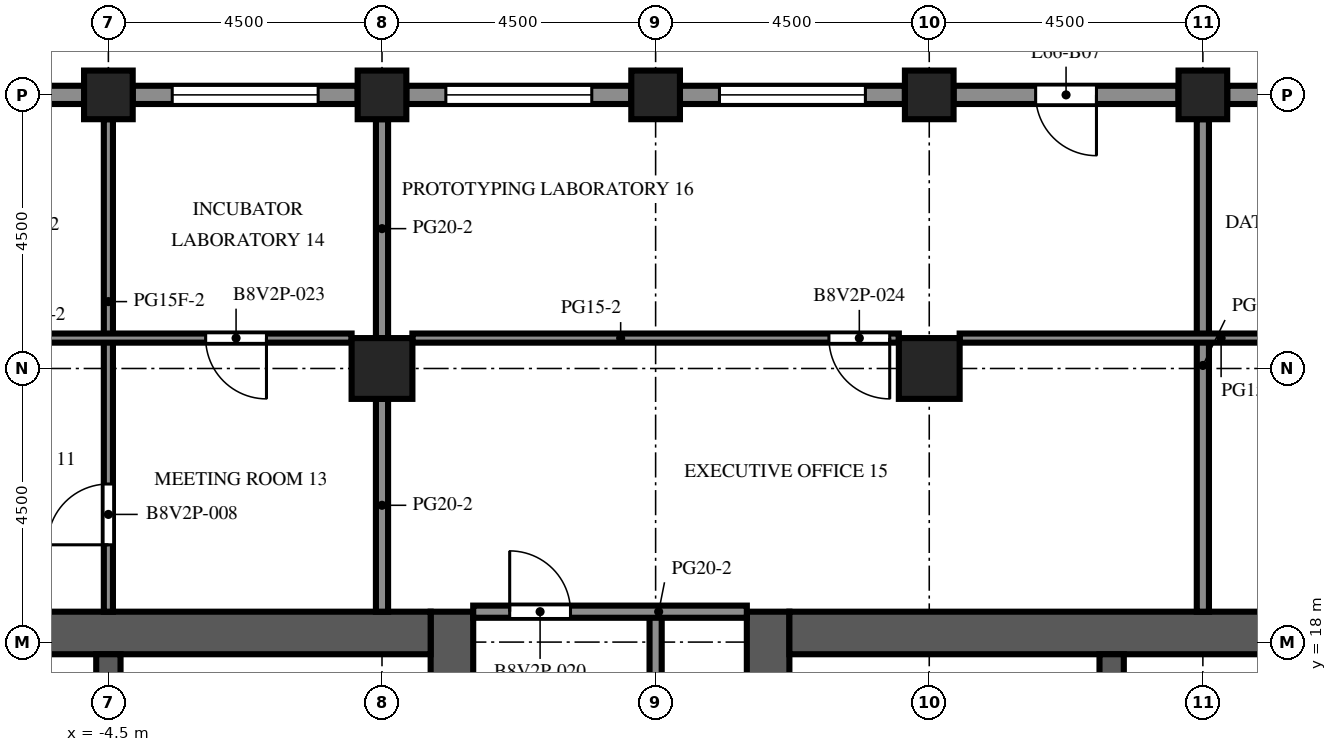
"""IFC4 building model, lengths in metres.
Left out: names, types, materials, properties, quantities, classifications, styles, units other than length and angle.
Written with IfcOpenShell. Run it as: python <this file> out.ifc"""

import sys

from ifc_helpers import new_model, si_unit, direction, frame, frame_2d, origin, origin_2d, place, context, subcontext, project, spatial, rectangle, extrude, element, fill, save


model = new_model("IFC4")
c1 = context("Model", 3, precision=1e-05, world=origin(), true_north=direction((0.0, 1.0)))
c2 = subcontext(c1, "Body", "Model", "MODEL_VIEW")
j1 = project(units=[si_unit("LENGTHUNIT", "METRE"), si_unit("PLANEANGLEUNIT", "RADIAN")], contexts=[c1])
p1 = place(None, origin())
s1 = spatial("IfcSite", under=j1, at=p1, CompositionType="ELEMENT")
p2 = place(p1, origin())
s2 = spatial("IfcBuilding", under=s1, at=p2, CompositionType="ELEMENT")
p3 = place(p2, frame((0.0, 0.0, 290.9)))
s3 = spatial("IfcBuildingStorey", under=s2, at=p3, CompositionType="ELEMENT", Elevation=290.9)
for number, where, z_axis, x_axis in (
    (1, (-4.5, 27.0, 0.0), (0.0, 0.0, 1.0), (1.0, 0.0, 0.0)),
    (2, (0.0, 27.0, 0.0), (0.0, 0.0, 1.0), (1.0, 0.0, 0.0)),
    (3, (4.5, 27.0, 0.0), (0.0, 0.0, 1.0), (1.0, 0.0, 0.0)),
    (4, (9.0, 27.0, 0.0), (0.0, 0.0, 1.0), (1.0, 0.0, 0.0)),
    (5, (13.5, 27.0, 0.0), (0.0, 0.0, 1.0), (1.0, 0.0, 0.0)),
):
    element("IfcColumn", number, at=place(p3, frame(where, z_axis=z_axis, x_axis=x_axis)), inside=s3, PredefinedType="COLUMN", context=c2, shape_type="SweptSolid", body=[
        extrude(rectangle(XDim=0.8, YDim=0.8, at=origin_2d()), origin(), (0.0, 0.0, 1.0), 4.1),
    ])
for number, where, z_axis, x_axis in (
    (6, (0.0, 22.5, 0.0), (0.0, 0.0, 1.0), (1.0, 0.0, 0.0)),
    (7, (9.0, 22.5, 0.0), (0.0, 0.0, 1.0), (1.0, 0.0, 0.0)),
):
    element("IfcColumn", number, at=place(p3, frame(where, z_axis=z_axis, x_axis=x_axis)), inside=s3, PredefinedType="COLUMN", context=c2, shape_type="SweptSolid", body=[
        extrude(rectangle(XDim=1.0, YDim=1.0, at=origin_2d()), origin(), (0.0, 0.0, 1.0), 4.1),
    ])
p4 = place(p3, frame((1.15, -9.0, 0.0), z_axis=(0.0, 0.0, 1.0), x_axis=(0.0, 1.0, 0.0)))
e8 = element("IfcWall", 8, at=p4, inside=s3, PredefinedType="SHEAR", context=c2, shape_type="SweptSolid", body=[
    extrude(rectangle(XDim=27.5, YDim=0.7, at=frame_2d((13.75, 0.0))), origin(), (0.0, 0.0, 1.0), 4.1),
])
p5 = place(p4, frame((12.55, 0.0, 0.0)))
e9 = element("IfcOpeningElement", 9, at=p5, cuts=e8, PredefinedType="OPENING", context=c2, shape_type="SweptSolid", body=[
    extrude(rectangle(XDim=2.4, YDim=2.4, at=frame_2d((1.2, 1.2))), frame((0.0, 0.36, 0.0), z_axis=(0.0, -1.0, 0.0), x_axis=(1.0, 0.0, 0.0)), (0.0, 0.0, 1.0), 0.72),
])
p6 = place(p4, frame((3.9, 0.0, 0.0)))
e10 = element("IfcOpeningElement", 10, at=p6, cuts=e8, PredefinedType="OPENING", context=c2, shape_type="SweptSolid", body=[
    extrude(rectangle(XDim=1.2, YDim=2.1, at=frame_2d((0.6, 1.05))), frame((0.0, 0.36, 0.0), z_axis=(0.0, -1.0, 0.0), x_axis=(1.0, 0.0, 0.0)), (0.0, 0.0, 1.0), 0.72),
])
p7 = place(p4, frame((22.4, 0.0, 0.0)))
e11 = element("IfcOpeningElement", 11, at=p7, cuts=e8, PredefinedType="OPENING", context=c2, shape_type="SweptSolid", body=[
    extrude(rectangle(XDim=1.2, YDim=2.1, at=frame_2d((0.6, 1.05))), frame((0.0, 0.36, 0.0), z_axis=(0.0, -1.0, 0.0), x_axis=(1.0, 0.0, 0.0)), (0.0, 0.0, 1.0), 0.72),
])
p8 = place(p3, frame((-9.8, 18.15, 0.0), z_axis=(0.0, 0.0, 1.0), x_axis=(1.0, 0.0, 0.0)))
e12 = element("IfcWall", 12, at=p8, inside=s3, PredefinedType="SHEAR", context=c2, shape_type="SweptSolid", body=[
    extrude(rectangle(XDim=10.6, YDim=0.7, at=frame_2d((5.3, 0.0))), origin(), (0.0, 0.0, 1.0), 4.1),
])
p9 = place(p3, frame((-4.5, 10.2, 0.0), z_axis=(0.0, 0.0, 1.0), x_axis=(0.0, 1.0, 0.0)))
e13 = element("IfcWall", 13, at=p9, inside=s3, PredefinedType="SHEAR", context=c2, shape_type="SweptSolid", body=[
    extrude(rectangle(XDim=7.6, YDim=0.4, at=frame_2d((3.8, 0.0))), origin(), (0.0, 0.0, 1.0), 4.1),
])
p10 = place(p3, frame((6.35, -9.0, 0.0), z_axis=(0.0, 0.0, 1.0), x_axis=(0.0, 1.0, 0.0)))
e14 = element("IfcWall", 14, at=p10, inside=s3, PredefinedType="SHEAR", context=c2, shape_type="SweptSolid", body=[
    extrude(rectangle(XDim=27.5, YDim=0.7, at=frame_2d((13.75, 0.0))), origin(), (0.0, 0.0, 1.0), 4.1),
])
p11 = place(p10, frame((12.55, 0.0, 0.0)))
e15 = element("IfcOpeningElement", 15, at=p11, cuts=e14, PredefinedType="OPENING", context=c2, shape_type="SweptSolid", body=[
    extrude(rectangle(XDim=2.4, YDim=2.4, at=frame_2d((1.2, 1.2))), frame((0.0, 0.36, 0.0), z_axis=(0.0, -1.0, 0.0), x_axis=(1.0, 0.0, 0.0)), (0.0, 0.0, 1.0), 0.72),
])
p12 = place(p10, frame((3.9, 0.0, 0.0)))
e16 = element("IfcOpeningElement", 16, at=p12, cuts=e14, PredefinedType="OPENING", context=c2, shape_type="SweptSolid", body=[
    extrude(rectangle(XDim=1.2, YDim=2.1, at=frame_2d((0.6, 1.05))), frame((0.0, 0.36, 0.0), z_axis=(0.0, -1.0, 0.0), x_axis=(1.0, 0.0, 0.0)), (0.0, 0.0, 1.0), 0.72),
])
p13 = place(p10, frame((22.4, 0.0, 0.0)))
e17 = element("IfcOpeningElement", 17, at=p13, cuts=e14, PredefinedType="OPENING", context=c2, shape_type="SweptSolid", body=[
    extrude(rectangle(XDim=1.2, YDim=2.1, at=frame_2d((0.6, 1.05))), frame((0.0, 0.36, 0.0), z_axis=(0.0, -1.0, 0.0), x_axis=(1.0, 0.0, 0.0)), (0.0, 0.0, 1.0), 0.72),
])
p14 = place(p3, frame((6.7, 18.15, 0.0), z_axis=(0.0, 0.0, 1.0), x_axis=(1.0, 0.0, 0.0)))
e18 = element("IfcWall", 18, at=p14, inside=s3, PredefinedType="SHEAR", context=c2, shape_type="SweptSolid", body=[
    extrude(rectangle(XDim=10.6, YDim=0.7, at=frame_2d((5.3, 0.0))), origin(), (0.0, 0.0, 1.0), 4.1),
])
p15 = place(p3, frame((12.0, 10.2, 0.0), z_axis=(0.0, 0.0, 1.0), x_axis=(0.0, 1.0, 0.0)))
e19 = element("IfcWall", 19, at=p15, inside=s3, PredefinedType="SHEAR", context=c2, shape_type="SweptSolid", body=[
    extrude(rectangle(XDim=7.6, YDim=0.4, at=frame_2d((3.8, 0.0))), origin(), (0.0, 0.0, 1.0), 4.1),
])
p16 = place(p3, frame((13.9, 27.0, 0.0), z_axis=(0.0, 0.0, 1.0), x_axis=(1.0, 0.0, 0.0)))
e20 = element("IfcWall", 20, at=p16, inside=s3, PredefinedType="SOLIDWALL", context=c2, shape_type="SweptSolid", body=[
    extrude(rectangle(XDim=3.7, YDim=0.3, at=frame_2d((1.85, 0.0))), origin(), (0.0, 0.0, 1.0), 2.7),
])
p17 = place(p16, frame((0.65, 0.0, 0.8)))
e21 = element("IfcOpeningElement", 21, at=p17, cuts=e20, PredefinedType="OPENING", context=c2, shape_type="SweptSolid", body=[
    extrude(rectangle(XDim=2.4, YDim=1.7, at=frame_2d((1.2, 0.85))), frame((0.0, 0.16, 0.0), z_axis=(0.0, -1.0, 0.0), x_axis=(1.0, 0.0, 0.0)), (0.0, 0.0, 1.0), 0.32),
])
p18 = place(p3, frame((9.4, 27.0, 0.0), z_axis=(0.0, 0.0, 1.0), x_axis=(1.0, 0.0, 0.0)))
e22 = element("IfcWall", 22, at=p18, inside=s3, PredefinedType="SOLIDWALL", context=c2, shape_type="SweptSolid", body=[
    extrude(rectangle(XDim=3.7, YDim=0.3, at=frame_2d((1.85, 0.0))), origin(), (0.0, 0.0, 1.0), 2.7),
])
p19 = place(p18, frame((1.35, 0.0, 0.0)))
e23 = element("IfcOpeningElement", 23, at=p19, cuts=e22, PredefinedType="OPENING", context=c2, shape_type="SweptSolid", body=[
    extrude(rectangle(XDim=1.0, YDim=2.2, at=frame_2d((0.5, 1.1))), frame((0.0, 0.16, 0.0), z_axis=(0.0, -1.0, 0.0), x_axis=(1.0, 0.0, 0.0)), (0.0, 0.0, 1.0), 0.32),
])
p20 = place(p3, frame((4.9, 27.0, 0.0), z_axis=(0.0, 0.0, 1.0), x_axis=(1.0, 0.0, 0.0)))
e24 = element("IfcWall", 24, at=p20, inside=s3, PredefinedType="SOLIDWALL", context=c2, shape_type="SweptSolid", body=[
    extrude(rectangle(XDim=3.7, YDim=0.3, at=frame_2d((1.85, 0.0))), origin(), (0.0, 0.0, 1.0), 2.7),
])
p21 = place(p20, frame((0.65, 0.0, 0.8)))
e25 = element("IfcOpeningElement", 25, at=p21, cuts=e24, PredefinedType="OPENING", context=c2, shape_type="SweptSolid", body=[
    extrude(rectangle(XDim=2.4, YDim=1.7, at=frame_2d((1.2, 0.85))), frame((0.0, 0.16, 0.0), z_axis=(0.0, -1.0, 0.0), x_axis=(1.0, 0.0, 0.0)), (0.0, 0.0, 1.0), 0.32),
])
p22 = place(p3, frame((0.4, 27.0, 0.0), z_axis=(0.0, 0.0, 1.0), x_axis=(1.0, 0.0, 0.0)))
e26 = element("IfcWall", 26, at=p22, inside=s3, PredefinedType="SOLIDWALL", context=c2, shape_type="SweptSolid", body=[
    extrude(rectangle(XDim=3.7, YDim=0.3, at=frame_2d((1.85, 0.0))), origin(), (0.0, 0.0, 1.0), 2.7),
])
p23 = place(p22, frame((0.65, 0.0, 0.8)))
e27 = element("IfcOpeningElement", 27, at=p23, cuts=e26, PredefinedType="OPENING", context=c2, shape_type="SweptSolid", body=[
    extrude(rectangle(XDim=2.4, YDim=1.7, at=frame_2d((1.2, 0.85))), frame((0.0, 0.16, 0.0), z_axis=(0.0, -1.0, 0.0), x_axis=(1.0, 0.0, 0.0)), (0.0, 0.0, 1.0), 0.32),
])
p24 = place(p3, frame((-4.1, 27.0, 0.0), z_axis=(0.0, 0.0, 1.0), x_axis=(1.0, 0.0, 0.0)))
e28 = element("IfcWall", 28, at=p24, inside=s3, PredefinedType="SOLIDWALL", context=c2, shape_type="SweptSolid", body=[
    extrude(rectangle(XDim=3.7, YDim=0.3, at=frame_2d((1.85, 0.0))), origin(), (0.0, 0.0, 1.0), 2.7),
])
p25 = place(p24, frame((0.65, 0.0, 0.8)))
e29 = element("IfcOpeningElement", 29, at=p25, cuts=e28, PredefinedType="OPENING", context=c2, shape_type="SweptSolid", body=[
    extrude(rectangle(XDim=2.4, YDim=1.7, at=frame_2d((1.2, 0.85))), frame((0.0, 0.16, 0.0), z_axis=(0.0, -1.0, 0.0), x_axis=(1.0, 0.0, 0.0)), (0.0, 0.0, 1.0), 0.32),
])
p26 = place(p3, frame((-8.6, 27.0, 0.0), z_axis=(0.0, 0.0, 1.0), x_axis=(1.0, 0.0, 0.0)))
e30 = element("IfcWall", 30, at=p26, inside=s3, PredefinedType="SOLIDWALL", context=c2, shape_type="SweptSolid", body=[
    extrude(rectangle(XDim=3.7, YDim=0.3, at=frame_2d((1.85, 0.0))), origin(), (0.0, 0.0, 1.0), 2.7),
])
p27 = place(p26, frame((0.65, 0.0, 0.8)))
e31 = element("IfcOpeningElement", 31, at=p27, cuts=e30, PredefinedType="OPENING", context=c2, shape_type="SweptSolid", body=[
    extrude(rectangle(XDim=2.4, YDim=1.7, at=frame_2d((1.2, 0.85))), frame((0.0, 0.16, 0.0), z_axis=(0.0, -1.0, 0.0), x_axis=(1.0, 0.0, 0.0)), (0.0, 0.0, 1.0), 0.32),
])
p28 = place(p3, frame((-0.6, 14.912, 0.0), z_axis=(0.0, 0.0, 1.0), x_axis=(0.0, 1.0, 0.0)))
e32 = element("IfcWall", 32, at=p28, inside=s3, PredefinedType="PARTITIONING", context=c2, shape_type="SweptSolid", body=[
    extrude(rectangle(XDim=2.888, YDim=0.1, at=frame_2d((1.444, 0.0))), origin(), (0.0, 0.0, 1.0), 3.5),
])
p29 = place(p28, frame((0.944, 0.0, 0.0)))
e33 = element("IfcOpeningElement", 33, at=p29, cuts=e32, PredefinedType="OPENING", context=c2, shape_type="SweptSolid", body=[
    extrude(rectangle(XDim=1.0, YDim=2.1, at=frame_2d((0.5, 1.05))), frame((0.0, 0.06, 0.0), z_axis=(0.0, -1.0, 0.0), x_axis=(1.0, 0.0, 0.0)), (0.0, 0.0, 1.0), 0.12),
])
p30 = place(p3, frame((8.1, 14.912, 0.0), z_axis=(0.0, 0.0, 1.0), x_axis=(0.0, 1.0, 0.0)))
e34 = element("IfcWall", 34, at=p30, inside=s3, PredefinedType="PARTITIONING", context=c2, shape_type="SweptSolid", body=[
    extrude(rectangle(XDim=2.888, YDim=0.1, at=frame_2d((1.444, 0.0))), origin(), (0.0, 0.0, 1.0), 3.5),
])
p31 = place(p30, frame((0.944, 0.0, 0.0)))
e35 = element("IfcOpeningElement", 35, at=p31, cuts=e34, PredefinedType="OPENING", context=c2, shape_type="SweptSolid", body=[
    extrude(rectangle(XDim=1.0, YDim=2.1, at=frame_2d((0.5, 1.05))), frame((0.0, 0.06, 0.0), z_axis=(0.0, -1.0, 0.0), x_axis=(1.0, 0.0, 0.0)), (0.0, 0.0, 1.0), 0.12),
])
p32 = place(p3, frame((-4.5, 26.6, 0.0), z_axis=(0.0, 0.0, 1.0), x_axis=(0.0, -1.0, 0.0)))
e36 = element("IfcWall", 36, at=p32, inside=s3, PredefinedType="PARTITIONING", context=c2, shape_type="SweptSolid", body=[
    extrude(rectangle(XDim=8.1, YDim=0.15, at=frame_2d((4.05, 0.0))), origin(), (0.0, 0.0, 1.0), 3.5),
])
p33 = place(p32, frame((6.0, 0.0, 0.0)))
e37 = element("IfcOpeningElement", 37, at=p33, cuts=e36, PredefinedType="OPENING", context=c2, shape_type="SweptSolid", body=[
    extrude(rectangle(XDim=1.0, YDim=2.1, at=frame_2d((0.5, 1.05))), frame((0.0, 0.085, 0.0), z_axis=(0.0, -1.0, 0.0), x_axis=(1.0, 0.0, 0.0)), (0.0, 0.0, 1.0), 0.17),
])
p34 = place(p3, frame((0.0, 18.5, 0.0), z_axis=(0.0, 0.0, 1.0), x_axis=(0.0, 1.0, 0.0)))
e38 = element("IfcWall", 38, at=p34, inside=s3, PredefinedType="PARTITIONING", context=c2, shape_type="SweptSolid", body=[
    extrude(rectangle(XDim=3.5, YDim=0.2, at=frame_2d((1.75, 0.0))), origin(), (0.0, 0.0, 1.0), 3.5),
])
p35 = place(p3, frame((0.0, 23.0, 0.0), z_axis=(0.0, 0.0, 1.0), x_axis=(0.0, 1.0, 0.0)))
e39 = element("IfcWall", 39, at=p35, inside=s3, PredefinedType="PARTITIONING", context=c2, shape_type="SweptSolid", body=[
    extrude(rectangle(XDim=3.6, YDim=0.2, at=frame_2d((1.8, 0.0))), origin(), (0.0, 0.0, 1.0), 3.5),
])
p36 = place(p3, frame((4.5, 18.5, 0.0), z_axis=(0.0, 0.0, 1.0), x_axis=(0.0, -1.0, 0.0)))
e40 = element("IfcWall", 40, at=p36, inside=s3, PredefinedType="PARTITIONING", context=c2, shape_type="SweptSolid", body=[
    extrude(rectangle(XDim=11.8, YDim=0.2, at=frame_2d((5.9, 0.0))), origin(), (0.0, 0.0, 1.0), 3.5),
])
p37 = place(p36, frame((3.95, 0.0, 0.0)))
e41 = element("IfcOpeningElement", 41, at=p37, cuts=e40, PredefinedType="OPENING", context=c2, shape_type="SweptSolid", body=[
    extrude(rectangle(XDim=1.0, YDim=2.1, at=frame_2d((0.5, 1.05))), frame((0.0, 0.11, 0.0), z_axis=(0.0, -1.0, 0.0), x_axis=(1.0, 0.0, 0.0)), (0.0, 0.0, 1.0), 0.22),
])
p38 = place(p3, frame((13.5, 18.5, 0.0), z_axis=(0.0, 0.0, 1.0), x_axis=(0.0, 1.0, 0.0)))
e42 = element("IfcWall", 42, at=p38, inside=s3, PredefinedType="PARTITIONING", context=c2, shape_type="SweptSolid", body=[
    extrude(rectangle(XDim=8.1, YDim=0.2, at=frame_2d((4.05, 0.0))), origin(), (0.0, 0.0, 1.0), 3.5),
])
p39 = place(p3, frame((1.5, 18.5, 0.0), z_axis=(0.0, 0.0, 1.0), x_axis=(1.0, 0.0, 0.0)))
e43 = element("IfcWall", 43, at=p39, inside=s3, PredefinedType="PARTITIONING", context=c2, shape_type="SweptSolid", body=[
    extrude(rectangle(XDim=4.5, YDim=0.2, at=frame_2d((2.25, 0.0))), origin(), (0.0, 0.0, 1.0), 3.5),
])
p40 = place(p39, frame((0.6, 0.0, 0.0)))
e44 = element("IfcOpeningElement", 44, at=p40, cuts=e43, PredefinedType="OPENING", context=c2, shape_type="SweptSolid", body=[
    extrude(rectangle(XDim=1.0, YDim=2.1, at=frame_2d((0.5, 1.05))), frame((0.0, 0.11, 0.0), z_axis=(0.0, -1.0, 0.0), x_axis=(1.0, 0.0, 0.0)), (0.0, 0.0, 1.0), 0.22),
])
p41 = place(p3, frame((-8.5, 23.0, 0.0), z_axis=(0.0, 0.0, 1.0), x_axis=(1.0, 0.0, 0.0)))
e45 = element("IfcWall", 45, at=p41, inside=s3, PredefinedType="PARTITIONING", context=c2, shape_type="SweptSolid", body=[
    extrude(rectangle(XDim=8.0, YDim=0.15, at=frame_2d((4.0, 0.0))), origin(), (0.0, 0.0, 1.0), 3.5),
])
p42 = place(p41, frame((5.6, 0.0, 0.0)))
e46 = element("IfcOpeningElement", 46, at=p42, cuts=e45, PredefinedType="OPENING", context=c2, shape_type="SweptSolid", body=[
    extrude(rectangle(XDim=1.0, YDim=2.1, at=frame_2d((0.5, 1.05))), frame((0.0, 0.085, 0.0), z_axis=(0.0, -1.0, 0.0), x_axis=(1.0, 0.0, 0.0)), (0.0, 0.0, 1.0), 0.17),
])
p43 = place(p3, frame((0.5, 23.0, 0.0), z_axis=(0.0, 0.0, 1.0), x_axis=(1.0, 0.0, 0.0)))
e47 = element("IfcWall", 47, at=p43, inside=s3, PredefinedType="PARTITIONING", context=c2, shape_type="SweptSolid", body=[
    extrude(rectangle(XDim=8.0, YDim=0.15, at=frame_2d((4.0, 0.0))), origin(), (0.0, 0.0, 1.0), 3.5),
])
p44 = place(p43, frame((6.85, 0.0, 0.0)))
e48 = element("IfcOpeningElement", 48, at=p44, cuts=e47, PredefinedType="OPENING", context=c2, shape_type="SweptSolid", body=[
    extrude(rectangle(XDim=1.0, YDim=2.1, at=frame_2d((0.5, 1.05))), frame((0.0, 0.085, 0.0), z_axis=(0.0, -1.0, 0.0), x_axis=(1.0, 0.0, 0.0)), (0.0, 0.0, 1.0), 0.17),
])
p45 = place(p3, frame((9.5, 23.0, 0.0), z_axis=(0.0, 0.0, 1.0), x_axis=(1.0, 0.0, 0.0)))
e49 = element("IfcWall", 49, at=p45, inside=s3, PredefinedType="PARTITIONING", context=c2, shape_type="SweptSolid", body=[
    extrude(rectangle(XDim=12.288, YDim=0.15, at=frame_2d((6.144, 0.0))), origin(), (0.0, 0.0, 1.0), 3.5),
])
p46 = place(p45, frame((8.6, 0.0, 0.0)))
e50 = element("IfcOpeningElement", 50, at=p46, cuts=e49, PredefinedType="OPENING", context=c2, shape_type="SweptSolid", body=[
    extrude(rectangle(XDim=1.0, YDim=2.1, at=frame_2d((0.5, 1.05))), frame((0.0, 0.085, 0.0), z_axis=(0.0, -1.0, 0.0), x_axis=(1.0, 0.0, 0.0)), (0.0, 0.0, 1.0), 0.17),
])
p47 = place(p19, origin())
e51 = element("IfcDoor", 51, at=p47, inside=s3, OperationType="SINGLE_SWING_RIGHT", PredefinedType="DOOR", context=c2, shape_type="SweptSolid", body=[
    extrude(rectangle(XDim=1.0, YDim=2.2, at=frame_2d((0.5, 1.1))), frame((0.0, 0.025, 0.0), z_axis=(0.0, -1.0, 0.0), x_axis=(1.0, 0.0, 0.0)), (0.0, 0.0, 1.0), 0.05),
])
fill(e23, e51)
p48 = place(p21, origin())
e52 = element("IfcWindow", 52, at=p48, inside=s3, PartitioningType="SINGLE_PANEL", PredefinedType="WINDOW", context=c2, shape_type="SweptSolid", body=[
    extrude(rectangle(XDim=2.4, YDim=1.7, at=frame_2d((1.2, 0.85))), frame((0.0, 0.03, 0.0), z_axis=(0.0, -1.0, 0.0), x_axis=(1.0, 0.0, 0.0)), (0.0, 0.0, 1.0), 0.06),
])
fill(e25, e52)
p49 = place(p23, origin())
e53 = element("IfcWindow", 53, at=p49, inside=s3, PartitioningType="SINGLE_PANEL", PredefinedType="WINDOW", context=c2, shape_type="SweptSolid", body=[
    extrude(rectangle(XDim=2.4, YDim=1.7, at=frame_2d((1.2, 0.85))), frame((0.0, 0.03, 0.0), z_axis=(0.0, -1.0, 0.0), x_axis=(1.0, 0.0, 0.0)), (0.0, 0.0, 1.0), 0.06),
])
fill(e27, e53)
p50 = place(p25, origin())
e54 = element("IfcWindow", 54, at=p50, inside=s3, PartitioningType="SINGLE_PANEL", PredefinedType="WINDOW", context=c2, shape_type="SweptSolid", body=[
    extrude(rectangle(XDim=2.4, YDim=1.7, at=frame_2d((1.2, 0.85))), frame((0.0, 0.03, 0.0), z_axis=(0.0, -1.0, 0.0), x_axis=(1.0, 0.0, 0.0)), (0.0, 0.0, 1.0), 0.06),
])
fill(e29, e54)
p51 = place(p33, origin())
e55 = element("IfcDoor", 55, at=p51, inside=s3, OperationType="SINGLE_SWING_RIGHT", PredefinedType="DOOR", context=c2, shape_type="SweptSolid", body=[
    extrude(rectangle(XDim=1.0, YDim=2.1, at=frame_2d((0.5, 1.05))), frame((0.0, 0.025, 0.0), z_axis=(0.0, -1.0, 0.0), x_axis=(1.0, 0.0, 0.0)), (0.0, 0.0, 1.0), 0.05),
])
fill(e37, e55)
p52 = place(p40, origin())
e56 = element("IfcDoor", 56, at=p52, inside=s3, OperationType="SINGLE_SWING_LEFT", PredefinedType="DOOR", context=c2, shape_type="SweptSolid", body=[
    extrude(rectangle(XDim=1.0, YDim=2.1, at=frame_2d((0.5, 1.05))), frame((0.0, 0.025, 0.0), z_axis=(0.0, -1.0, 0.0), x_axis=(1.0, 0.0, 0.0)), (0.0, 0.0, 1.0), 0.05),
])
fill(e44, e56)
p53 = place(p42, origin())
e57 = element("IfcDoor", 57, at=p53, inside=s3, OperationType="SINGLE_SWING_RIGHT", PredefinedType="DOOR", context=c2, shape_type="SweptSolid", body=[
    extrude(rectangle(XDim=1.0, YDim=2.1, at=frame_2d((0.5, 1.05))), frame((0.0, 0.025, 0.0), z_axis=(0.0, -1.0, 0.0), x_axis=(1.0, 0.0, 0.0)), (0.0, 0.0, 1.0), 0.05),
])
fill(e46, e57)
p54 = place(p44, origin())
e58 = element("IfcDoor", 58, at=p54, inside=s3, OperationType="SINGLE_SWING_RIGHT", PredefinedType="DOOR", context=c2, shape_type="SweptSolid", body=[
    extrude(rectangle(XDim=1.0, YDim=2.1, at=frame_2d((0.5, 1.05))), frame((0.0, 0.025, 0.0), z_axis=(0.0, -1.0, 0.0), x_axis=(1.0, 0.0, 0.0)), (0.0, 0.0, 1.0), 0.05),
])
fill(e48, e58)
save(model, sys.argv[1])
